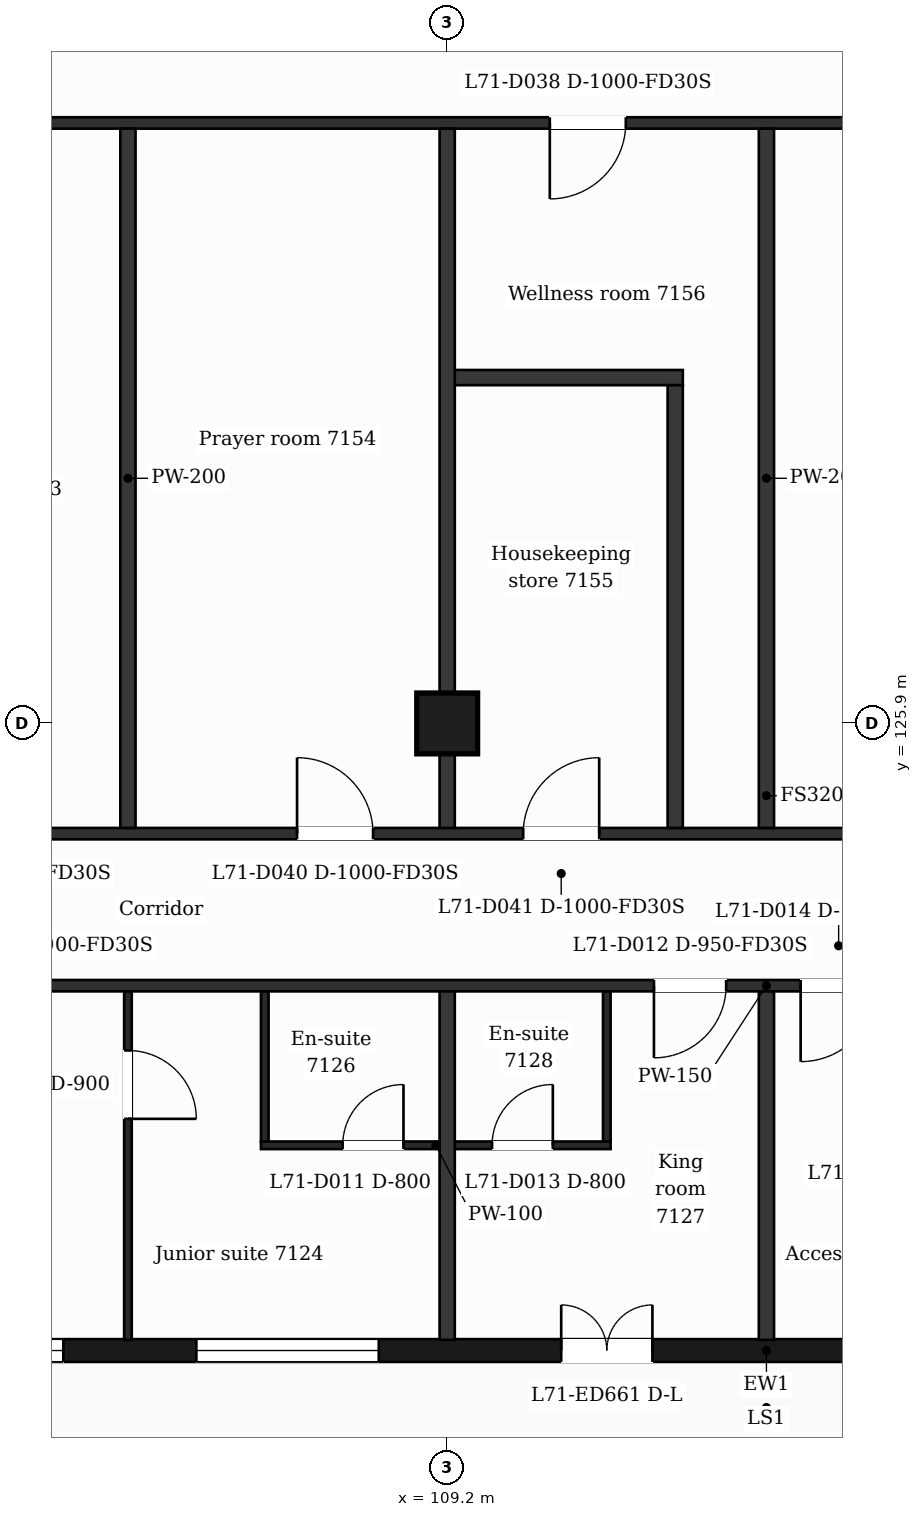
"""IFC4 building model, lengths in metres.
Left out: names, types, materials, properties, quantities, classifications, styles, units other than length and angle.
Written with IfcOpenShell. Run it as: python <this file> out.ifc"""

import sys

from ifc_helpers import new_model, si_unit, direction, frame, frame_2d, origin, origin_2d, place, context, subcontext, project, spatial, rectangle, extrude, element, fill, save


model = new_model("IFC4")
c1 = context("Model", 3, precision=1e-05, world=origin(), true_north=direction((0.0, 1.0)))
c2 = subcontext(c1, "Body", "Model", "MODEL_VIEW")
j1 = project(units=[si_unit("LENGTHUNIT", "METRE"), si_unit("PLANEANGLEUNIT", "RADIAN")], contexts=[c1])
p1 = place(None, origin())
s1 = spatial("IfcSite", under=j1, at=p1, CompositionType="ELEMENT")
p2 = place(p1, origin())
s2 = spatial("IfcBuilding", under=s1, at=p2, CompositionType="ELEMENT")
p3 = place(p2, frame((0.0, 0.0, 292.3)))
s3 = spatial("IfcBuildingStorey", under=s2, at=p3, CompositionType="ELEMENT", Elevation=292.3)
p4 = place(p3, frame((109.2, 125.9, 0.0), z_axis=(0.0, 0.0, 1.0), x_axis=(1.0, 0.0, 0.0)))
e1 = element("IfcColumn", 1, at=p4, inside=s3, PredefinedType="COLUMN", context=c2, shape_type="SweptSolid", body=[
    extrude(rectangle(XDim=0.8, YDim=0.8, at=origin_2d()), origin(), (0.0, 0.0, 1.0), 3.7),
])
p5 = place(p3, frame((100.8, 117.65, 0.0), z_axis=(0.0, 0.0, 1.0), x_axis=(1.0, 0.0, 0.0)))
e2 = element("IfcWall", 2, at=p5, inside=s3, PredefinedType="SOLIDWALL", context=c2, shape_type="SweptSolid", body=[
    extrude(rectangle(XDim=25.2, YDim=0.3, at=frame_2d((12.6, 0.0))), origin(), (0.0, 0.0, 1.0), 3.38),
])
p6 = place(p5, frame((0.95, 0.0, 0.9)))
e3 = element("IfcOpeningElement", 3, at=p6, cuts=e2, PredefinedType="OPENING", context=c2, shape_type="SweptSolid", body=[
    extrude(rectangle(XDim=2.4, YDim=2.1, at=frame_2d((1.2, 1.05))), frame((0.0, 0.16, 0.0), z_axis=(0.0, -1.0, 0.0), x_axis=(1.0, 0.0, 0.0)), (0.0, 0.0, 1.0), 0.32),
])
p7 = place(p5, frame((5.1, 0.0, 0.9)))
e4 = element("IfcOpeningElement", 4, at=p7, cuts=e2, PredefinedType="OPENING", context=c2, shape_type="SweptSolid", body=[
    extrude(rectangle(XDim=2.4, YDim=2.1, at=frame_2d((1.2, 1.05))), frame((0.0, 0.16, 0.0), z_axis=(0.0, -1.0, 0.0), x_axis=(1.0, 0.0, 0.0)), (0.0, 0.0, 1.0), 0.32),
])
p8 = place(p5, frame((9.9, 0.0, 0.0)))
e5 = element("IfcOpeningElement", 5, at=p8, cuts=e2, PredefinedType="OPENING", context=c2, shape_type="SweptSolid", body=[
    extrude(rectangle(XDim=1.2, YDim=2.4, at=frame_2d((0.6, 1.2))), frame((0.0, 0.16, 0.0), z_axis=(0.0, -1.0, 0.0), x_axis=(1.0, 0.0, 0.0)), (0.0, 0.0, 1.0), 0.32),
])
p9 = place(p5, frame((14.1, 0.0, 0.9)))
e6 = element("IfcOpeningElement", 6, at=p9, cuts=e2, PredefinedType="OPENING", context=c2, shape_type="SweptSolid", body=[
    extrude(rectangle(XDim=1.2, YDim=2.1, at=frame_2d((0.6, 1.05))), frame((0.0, 0.16, 0.0), z_axis=(0.0, -1.0, 0.0), x_axis=(1.0, 0.0, 0.0)), (0.0, 0.0, 1.0), 0.32),
])
p10 = place(p5, frame((17.7, 0.0, 0.9)))
e7 = element("IfcOpeningElement", 7, at=p10, cuts=e2, PredefinedType="OPENING", context=c2, shape_type="SweptSolid", body=[
    extrude(rectangle(XDim=2.4, YDim=2.1, at=frame_2d((1.2, 1.05))), frame((0.0, 0.16, 0.0), z_axis=(0.0, -1.0, 0.0), x_axis=(1.0, 0.0, 0.0)), (0.0, 0.0, 1.0), 0.32),
])
p11 = place(p5, frame((21.85, 0.0, 0.9)))
e8 = element("IfcOpeningElement", 8, at=p11, cuts=e2, PredefinedType="OPENING", context=c2, shape_type="SweptSolid", body=[
    extrude(rectangle(XDim=2.4, YDim=2.1, at=frame_2d((1.2, 1.05))), frame((0.0, 0.16, 0.0), z_axis=(0.0, -1.0, 0.0), x_axis=(1.0, 0.0, 0.0)), (0.0, 0.0, 1.0), 0.32),
])
p12 = place(p3, frame((106.75, 120.35, 0.0), z_axis=(0.0, 0.0, 1.0), x_axis=(1.0, 0.0, 0.0)))
e9 = element("IfcWall", 9, at=p12, inside=s3, PredefinedType="PARTITIONING", context=c2, shape_type="SweptSolid", body=[
    extrude(rectangle(XDim=4.6, YDim=0.1, at=frame_2d((2.3, 0.0))), origin(), (0.0, 0.0, 1.0), 3.38),
])
p13 = place(p12, frame((1.075, 0.0, 0.0)))
e10 = element("IfcOpeningElement", 10, at=p13, cuts=e9, PredefinedType="OPENING", context=c2, shape_type="SweptSolid", body=[
    extrude(rectangle(XDim=0.8, YDim=2.1, at=frame_2d((0.4, 1.05))), frame((0.0, 0.06, 0.0), z_axis=(0.0, -1.0, 0.0), x_axis=(1.0, 0.0, 0.0)), (0.0, 0.0, 1.0), 0.12),
])
p14 = place(p12, frame((3.04, 0.0, 0.0)))
e11 = element("IfcOpeningElement", 11, at=p14, cuts=e9, PredefinedType="OPENING", context=c2, shape_type="SweptSolid", body=[
    extrude(rectangle(XDim=0.8, YDim=2.1, at=frame_2d((0.4, 1.05))), frame((0.0, 0.06, 0.0), z_axis=(0.0, -1.0, 0.0), x_axis=(1.0, 0.0, 0.0)), (0.0, 0.0, 1.0), 0.12),
])
p15 = place(p3, frame((100.8, 122.45, 0.0), z_axis=(0.0, 0.0, 1.0), x_axis=(1.0, 0.0, 0.0)))
e12 = element("IfcWall", 12, at=p15, inside=s3, PredefinedType="PARTITIONING", context=c2, shape_type="SweptSolid", body=[
    extrude(rectangle(XDim=25.2, YDim=0.15, at=frame_2d((12.6, 0.0))), origin(), (0.0, 0.0, 1.0), 3.38),
])
p16 = place(p15, frame((1.6, 0.0, 0.0)))
e13 = element("IfcOpeningElement", 13, at=p16, cuts=e12, PredefinedType="OPENING", context=c2, shape_type="SweptSolid", body=[
    extrude(rectangle(XDim=1.0, YDim=2.1, at=frame_2d((0.5, 1.05))), frame((0.0, 0.085, 0.0), z_axis=(0.0, -1.0, 0.0), x_axis=(1.0, 0.0, 0.0)), (0.0, 0.0, 1.0), 0.17),
])
p17 = place(p15, frame((11.12, 0.0, 0.0)))
e14 = element("IfcOpeningElement", 14, at=p17, cuts=e12, PredefinedType="OPENING", context=c2, shape_type="SweptSolid", body=[
    extrude(rectangle(XDim=0.95, YDim=2.1, at=frame_2d((0.475, 1.05))), frame((0.0, 0.085, 0.0), z_axis=(0.0, -1.0, 0.0), x_axis=(1.0, 0.0, 0.0)), (0.0, 0.0, 1.0), 0.17),
])
p18 = place(p15, frame((13.05, 0.0, 0.0)))
e15 = element("IfcOpeningElement", 15, at=p18, cuts=e12, PredefinedType="OPENING", context=c2, shape_type="SweptSolid", body=[
    extrude(rectangle(XDim=1.0, YDim=2.1, at=frame_2d((0.5, 1.05))), frame((0.0, 0.085, 0.0), z_axis=(0.0, -1.0, 0.0), x_axis=(1.0, 0.0, 0.0)), (0.0, 0.0, 1.0), 0.17),
])
p19 = place(p15, frame((19.61, 0.0, 0.0)))
e16 = element("IfcOpeningElement", 16, at=p19, cuts=e12, PredefinedType="OPENING", context=c2, shape_type="SweptSolid", body=[
    extrude(rectangle(XDim=0.95, YDim=2.1, at=frame_2d((0.475, 1.05))), frame((0.0, 0.085, 0.0), z_axis=(0.0, -1.0, 0.0), x_axis=(1.0, 0.0, 0.0)), (0.0, 0.0, 1.0), 0.17),
])
p20 = place(p15, frame((21.275, 0.0, 0.0)))
e17 = element("IfcOpeningElement", 17, at=p20, cuts=e12, PredefinedType="OPENING", context=c2, shape_type="SweptSolid", body=[
    extrude(rectangle(XDim=0.95, YDim=2.1, at=frame_2d((0.475, 1.05))), frame((0.0, 0.085, 0.0), z_axis=(0.0, -1.0, 0.0), x_axis=(1.0, 0.0, 0.0)), (0.0, 0.0, 1.0), 0.17),
])
p21 = place(p3, frame((100.8, 124.45, 0.0), z_axis=(0.0, 0.0, 1.0), x_axis=(1.0, 0.0, 0.0)))
e18 = element("IfcWall", 18, at=p21, inside=s3, PredefinedType="PARTITIONING", context=c2, shape_type="SweptSolid", body=[
    extrude(rectangle(XDim=25.2, YDim=0.15, at=frame_2d((12.6, 0.0))), origin(), (0.0, 0.0, 1.0), 3.38),
])
p22 = place(p21, frame((1.85, 0.0, 0.0)))
e19 = element("IfcOpeningElement", 19, at=p22, cuts=e18, PredefinedType="OPENING", context=c2, shape_type="SweptSolid", body=[
    extrude(rectangle(XDim=1.0, YDim=2.1, at=frame_2d((0.5, 1.05))), frame((0.0, 0.085, 0.0), z_axis=(0.0, -1.0, 0.0), x_axis=(1.0, 0.0, 0.0)), (0.0, 0.0, 1.0), 0.17),
])
p23 = place(p21, frame((6.425, 0.0, 0.0)))
e20 = element("IfcOpeningElement", 20, at=p23, cuts=e18, PredefinedType="OPENING", context=c2, shape_type="SweptSolid", body=[
    extrude(rectangle(XDim=1.0, YDim=2.1, at=frame_2d((0.5, 1.05))), frame((0.0, 0.085, 0.0), z_axis=(0.0, -1.0, 0.0), x_axis=(1.0, 0.0, 0.0)), (0.0, 0.0, 1.0), 0.17),
])
p24 = place(p21, frame((9.4, 0.0, 0.0)))
e21 = element("IfcOpeningElement", 21, at=p24, cuts=e18, PredefinedType="OPENING", context=c2, shape_type="SweptSolid", body=[
    extrude(rectangle(XDim=1.0, YDim=2.1, at=frame_2d((0.5, 1.05))), frame((0.0, 0.085, 0.0), z_axis=(0.0, -1.0, 0.0), x_axis=(1.0, 0.0, 0.0)), (0.0, 0.0, 1.0), 0.17),
])
p25 = place(p21, frame((14.825, 0.0, 0.0)))
e22 = element("IfcOpeningElement", 22, at=p25, cuts=e18, PredefinedType="OPENING", context=c2, shape_type="SweptSolid", body=[
    extrude(rectangle(XDim=1.0, YDim=2.1, at=frame_2d((0.5, 1.05))), frame((0.0, 0.085, 0.0), z_axis=(0.0, -1.0, 0.0), x_axis=(1.0, 0.0, 0.0)), (0.0, 0.0, 1.0), 0.17),
])
p26 = place(p21, frame((18.825, 0.0, 0.0)))
e23 = element("IfcOpeningElement", 23, at=p26, cuts=e18, PredefinedType="OPENING", context=c2, shape_type="SweptSolid", body=[
    extrude(rectangle(XDim=1.0, YDim=2.1, at=frame_2d((0.5, 1.05))), frame((0.0, 0.085, 0.0), z_axis=(0.0, -1.0, 0.0), x_axis=(1.0, 0.0, 0.0)), (0.0, 0.0, 1.0), 0.17),
])
p27 = place(p3, frame((109.2, 130.45, 0.0), z_axis=(0.0, 0.0, 1.0), x_axis=(1.0, 0.0, 0.0)))
e24 = element("IfcWall", 24, at=p27, inside=s3, PredefinedType="PARTITIONING", context=c2, shape_type="SweptSolid", body=[
    extrude(rectangle(XDim=3.1, YDim=0.2, at=frame_2d((1.55, 0.0))), origin(), (0.0, 0.0, 1.0), 3.38),
])
p28 = place(p3, frame((100.725, 133.8, 0.0), z_axis=(0.0, 0.0, 1.0), x_axis=(1.0, 0.0, 0.0)))
e25 = element("IfcWall", 25, at=p28, inside=s3, PredefinedType="PARTITIONING", context=c2, shape_type="SweptSolid", body=[
    extrude(rectangle(XDim=25.35, YDim=0.15, at=frame_2d((12.675, 0.0))), origin(), (0.0, 0.0, 1.0), 3.38),
])
p29 = place(p28, frame((9.825, 0.0, 0.0)))
e26 = element("IfcOpeningElement", 26, at=p29, cuts=e25, PredefinedType="OPENING", context=c2, shape_type="SweptSolid", body=[
    extrude(rectangle(XDim=1.0, YDim=2.1, at=frame_2d((0.5, 1.05))), frame((0.0, 0.085, 0.0), z_axis=(0.0, -1.0, 0.0), x_axis=(1.0, 0.0, 0.0)), (0.0, 0.0, 1.0), 0.17),
])
p30 = place(p3, frame((105.0, 117.79, 0.0), z_axis=(0.0, 0.0, 1.0), x_axis=(0.0, 1.0, 0.0)))
e27 = element("IfcWall", 27, at=p30, inside=s3, PredefinedType="PARTITIONING", context=c2, shape_type="SweptSolid", body=[
    extrude(rectangle(XDim=4.585, YDim=0.1, at=frame_2d((2.292, 0.0))), origin(), (0.0, 0.0, 1.0), 3.38),
])
p31 = place(p30, frame((2.908, 0.0, 0.0)))
e28 = element("IfcOpeningElement", 28, at=p31, cuts=e27, PredefinedType="OPENING", context=c2, shape_type="SweptSolid", body=[
    extrude(rectangle(XDim=0.9, YDim=2.1, at=frame_2d((0.45, 1.05))), frame((0.0, 0.06, 0.0), z_axis=(0.0, -1.0, 0.0), x_axis=(1.0, 0.0, 0.0)), (0.0, 0.0, 1.0), 0.12),
])
p32 = place(p3, frame((105.0, 124.525, 0.0), z_axis=(0.0, 0.0, 1.0), x_axis=(0.0, 1.0, 0.0)))
e29 = element("IfcWall", 29, at=p32, inside=s3, PredefinedType="PARTITIONING", context=c2, shape_type="SweptSolid", body=[
    extrude(rectangle(XDim=9.2, YDim=0.2, at=frame_2d((4.6, 0.0))), origin(), (0.0, 0.0, 1.0), 3.38),
])
p33 = place(p3, frame((106.8, 120.4, 0.0), z_axis=(0.0, 0.0, 1.0), x_axis=(0.0, 1.0, 0.0)))
e30 = element("IfcWall", 30, at=p33, inside=s3, PredefinedType="PARTITIONING", context=c2, shape_type="SweptSolid", body=[
    extrude(rectangle(XDim=1.975, YDim=0.1, at=frame_2d((0.988, 0.0))), origin(), (0.0, 0.0, 1.0), 3.38),
])
p34 = place(p3, frame((109.2, 117.79, 0.0), z_axis=(0.0, 0.0, 1.0), x_axis=(0.0, 1.0, 0.0)))
e31 = element("IfcWall", 31, at=p34, inside=s3, PredefinedType="PARTITIONING", context=c2, shape_type="SweptSolid", body=[
    extrude(rectangle(XDim=4.585, YDim=0.2, at=frame_2d((2.292, 0.0))), origin(), (0.0, 0.0, 1.0), 3.38),
])
p35 = place(p3, frame((109.2, 124.525, 0.0), z_axis=(0.0, 0.0, 1.0), x_axis=(0.0, 1.0, 0.0)))
e32 = element("IfcWall", 32, at=p35, inside=s3, PredefinedType="PARTITIONING", context=c2, shape_type="SweptSolid", body=[
    extrude(rectangle(XDim=9.2, YDim=0.2, at=frame_2d((4.6, 0.0))), origin(), (0.0, 0.0, 1.0), 3.38),
])
p36 = place(p3, frame((111.3, 120.4, 0.0), z_axis=(0.0, 0.0, 1.0), x_axis=(0.0, 1.0, 0.0)))
e33 = element("IfcWall", 33, at=p36, inside=s3, PredefinedType="PARTITIONING", context=c2, shape_type="SweptSolid", body=[
    extrude(rectangle(XDim=1.975, YDim=0.1, at=frame_2d((0.988, 0.0))), origin(), (0.0, 0.0, 1.0), 3.38),
])
p37 = place(p3, frame((112.2, 124.525, 0.0), z_axis=(0.0, 0.0, 1.0), x_axis=(0.0, 1.0, 0.0)))
e34 = element("IfcWall", 34, at=p37, inside=s3, PredefinedType="PARTITIONING", context=c2, shape_type="SweptSolid", body=[
    extrude(rectangle(XDim=5.825, YDim=0.2, at=frame_2d((2.913, 0.0))), origin(), (0.0, 0.0, 1.0), 3.38),
])
p38 = place(p3, frame((113.4, 117.79, 0.0), z_axis=(0.0, 0.0, 1.0), x_axis=(0.0, 1.0, 0.0)))
e35 = element("IfcWall", 35, at=p38, inside=s3, PredefinedType="PARTITIONING", context=c2, shape_type="SweptSolid", body=[
    extrude(rectangle(XDim=4.585, YDim=0.2, at=frame_2d((2.292, 0.0))), origin(), (0.0, 0.0, 1.0), 3.38),
])
p39 = place(p3, frame((113.4, 124.525, 0.0), z_axis=(0.0, 0.0, 1.0), x_axis=(0.0, 1.0, 0.0)))
e36 = element("IfcWall", 36, at=p39, inside=s3, PredefinedType="PARTITIONING", context=c2, shape_type="SweptSolid", body=[
    extrude(rectangle(XDim=9.2, YDim=0.2, at=frame_2d((4.6, 0.0))), origin(), (0.0, 0.0, 1.0), 3.38),
])
p40 = place(p6, origin())
e37 = element("IfcWindow", 37, at=p40, inside=s3, PartitioningType="SINGLE_PANEL", PredefinedType="WINDOW", context=c2, shape_type="SweptSolid", body=[
    extrude(rectangle(XDim=2.4, YDim=2.1, at=frame_2d((1.2, 1.05))), frame((0.0, 0.03, 0.0), z_axis=(0.0, -1.0, 0.0), x_axis=(1.0, 0.0, 0.0)), (0.0, 0.0, 1.0), 0.06),
])
fill(e3, e37)
p41 = place(p7, origin())
e38 = element("IfcWindow", 38, at=p41, inside=s3, PartitioningType="SINGLE_PANEL", PredefinedType="WINDOW", context=c2, shape_type="SweptSolid", body=[
    extrude(rectangle(XDim=2.4, YDim=2.1, at=frame_2d((1.2, 1.05))), frame((0.0, 0.03, 0.0), z_axis=(0.0, -1.0, 0.0), x_axis=(1.0, 0.0, 0.0)), (0.0, 0.0, 1.0), 0.06),
])
fill(e4, e38)
p42 = place(p8, origin())
e39 = element("IfcDoor", 39, at=p42, inside=s3, OperationType="DOUBLE_DOOR_SINGLE_SWING", PredefinedType="DOOR", context=c2, shape_type="SweptSolid", body=[
    extrude(rectangle(XDim=1.2, YDim=2.4, at=frame_2d((0.6, 1.2))), frame((0.0, 0.025, 0.0), z_axis=(0.0, -1.0, 0.0), x_axis=(1.0, 0.0, 0.0)), (0.0, 0.0, 1.0), 0.05),
])
fill(e5, e39)
p43 = place(p31, origin())
e40 = element("IfcDoor", 40, at=p43, inside=s3, OperationType="SINGLE_SWING_LEFT", PredefinedType="DOOR", context=c2, shape_type="SweptSolid", body=[
    extrude(rectangle(XDim=0.9, YDim=2.1, at=frame_2d((0.45, 1.05))), frame((0.0, 0.025, 0.0), z_axis=(0.0, -1.0, 0.0), x_axis=(1.0, 0.0, 0.0)), (0.0, 0.0, 1.0), 0.05),
])
fill(e28, e40)
p44 = place(p13, origin())
e41 = element("IfcDoor", 41, at=p44, inside=s3, OperationType="SINGLE_SWING_RIGHT", PredefinedType="DOOR", context=c2, shape_type="SweptSolid", body=[
    extrude(rectangle(XDim=0.8, YDim=2.1, at=frame_2d((0.4, 1.05))), frame((0.0, 0.025, 0.0), z_axis=(0.0, -1.0, 0.0), x_axis=(1.0, 0.0, 0.0)), (0.0, 0.0, 1.0), 0.05),
])
fill(e10, e41)
p45 = place(p17, origin())
e42 = element("IfcDoor", 42, at=p45, inside=s3, OperationType="SINGLE_SWING_LEFT", PredefinedType="DOOR", context=c2, shape_type="SweptSolid", body=[
    extrude(rectangle(XDim=0.95, YDim=2.1, at=frame_2d((0.475, 1.05))), frame((0.0, 0.025, 0.0), z_axis=(0.0, -1.0, 0.0), x_axis=(1.0, 0.0, 0.0)), (0.0, 0.0, 1.0), 0.05),
])
fill(e14, e42)
p46 = place(p14, origin())
e43 = element("IfcDoor", 43, at=p46, inside=s3, OperationType="SINGLE_SWING_RIGHT", PredefinedType="DOOR", context=c2, shape_type="SweptSolid", body=[
    extrude(rectangle(XDim=0.8, YDim=2.1, at=frame_2d((0.4, 1.05))), frame((0.0, 0.025, 0.0), z_axis=(0.0, -1.0, 0.0), x_axis=(1.0, 0.0, 0.0)), (0.0, 0.0, 1.0), 0.05),
])
fill(e11, e43)
p47 = place(p18, origin())
e44 = element("IfcDoor", 44, at=p47, inside=s3, OperationType="SINGLE_SWING_LEFT", PredefinedType="DOOR", context=c2, shape_type="SweptSolid", body=[
    extrude(rectangle(XDim=1.0, YDim=2.1, at=frame_2d((0.5, 1.05))), frame((0.0, 0.025, 0.0), z_axis=(0.0, -1.0, 0.0), x_axis=(1.0, 0.0, 0.0)), (0.0, 0.0, 1.0), 0.05),
])
fill(e15, e44)
p48 = place(p29, origin())
e45 = element("IfcDoor", 45, at=p48, inside=s3, OperationType="SINGLE_SWING_LEFT", PredefinedType="DOOR", context=c2, shape_type="SweptSolid", body=[
    extrude(rectangle(XDim=1.0, YDim=2.1, at=frame_2d((0.5, 1.05))), frame((0.0, 0.025, 0.0), z_axis=(0.0, -1.0, 0.0), x_axis=(1.0, 0.0, 0.0)), (0.0, 0.0, 1.0), 0.05),
])
fill(e26, e45)
p49 = place(p23, origin())
e46 = element("IfcDoor", 46, at=p49, inside=s3, OperationType="SINGLE_SWING_LEFT", PredefinedType="DOOR", context=c2, shape_type="SweptSolid", body=[
    extrude(rectangle(XDim=1.0, YDim=2.1, at=frame_2d((0.5, 1.05))), frame((0.0, 0.025, 0.0), z_axis=(0.0, -1.0, 0.0), x_axis=(1.0, 0.0, 0.0)), (0.0, 0.0, 1.0), 0.05),
])
fill(e20, e46)
p50 = place(p24, origin())
e47 = element("IfcDoor", 47, at=p50, inside=s3, OperationType="SINGLE_SWING_RIGHT", PredefinedType="DOOR", context=c2, shape_type="SweptSolid", body=[
    extrude(rectangle(XDim=1.0, YDim=2.1, at=frame_2d((0.5, 1.05))), frame((0.0, 0.025, 0.0), z_axis=(0.0, -1.0, 0.0), x_axis=(1.0, 0.0, 0.0)), (0.0, 0.0, 1.0), 0.05),
])
fill(e21, e47)
save(model, sys.argv[1])
